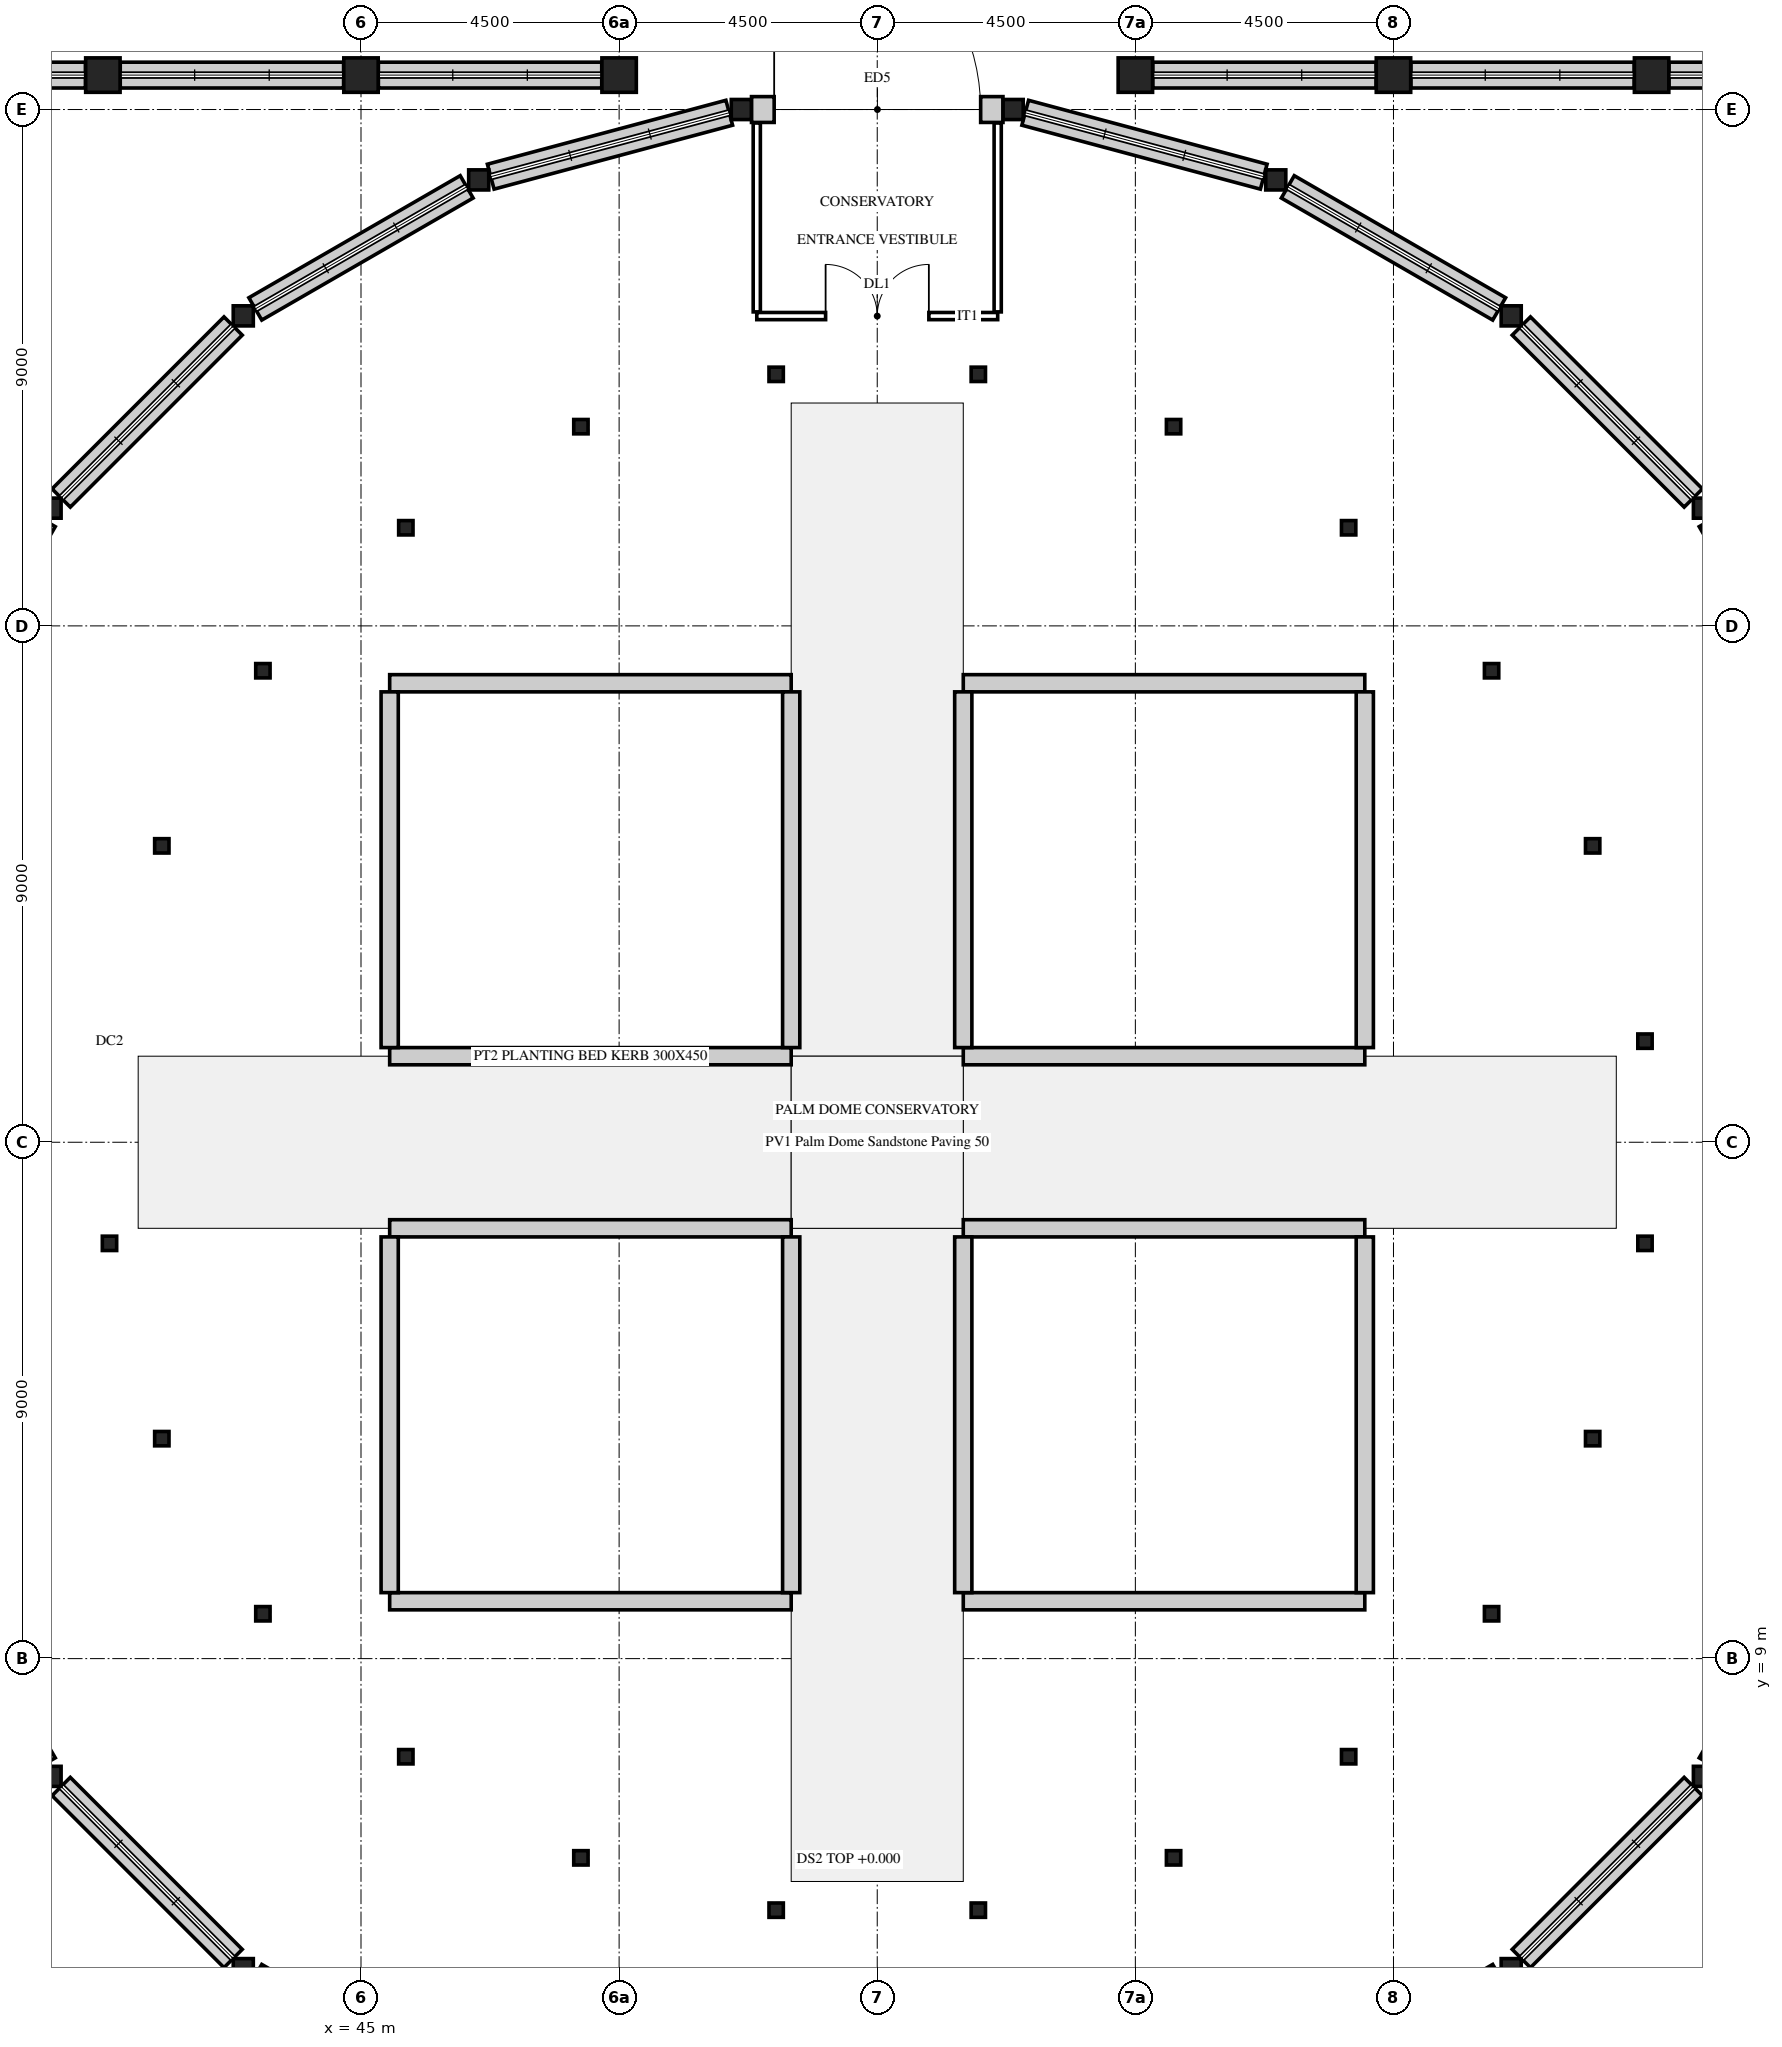
"""IFC4 building model, lengths in metres.
Left out: names, types, materials, properties, quantities, classifications, styles, units other than length and angle.
Written with IfcOpenShell. Run it as: python <this file> out.ifc"""

import sys

from ifc_helpers import new_model, si_unit, direction, frame, frame_2d, origin, origin_2d, place, context, subcontext, project, spatial, rectangle, hollow_rectangle, extrude, element, fill, save


model = new_model("IFC4")
c1 = context("Model", 3, precision=1e-05, world=origin(), true_north=direction((0.0, 1.0)))
c2 = subcontext(c1, "Body", "Model", "MODEL_VIEW")
j1 = project(units=[si_unit("LENGTHUNIT", "METRE"), si_unit("PLANEANGLEUNIT", "RADIAN")], contexts=[c1])
p1 = place(None, origin())
s1 = spatial("IfcSite", under=j1, at=p1, CompositionType="ELEMENT")
p2 = place(p1, origin())
s2 = spatial("IfcBuilding", under=s1, at=p2, CompositionType="ELEMENT")
p3 = place(p2, origin())
s3 = spatial("IfcBuildingStorey", under=s2, at=p3, CompositionType="ELEMENT", Elevation=0.0)
for number, where, z_axis, x_axis in (
    (1, (68.404, 29.052, 0.0), (0.0, 0.0, 1.0), (1.0, 0.0, 0.0)),
    (2, (65.052, 32.404, 0.0), (0.0, 0.0, 1.0), (1.0, 0.0, 0.0)),
    (3, (60.948, 34.773, 0.0), (0.0, 0.0, 1.0), (1.0, 0.0, 0.0)),
    (4, (56.37, 36.0, 0.0), (0.0, 0.0, 1.0), (1.0, 0.0, 0.0)),
    (5, (51.63, 36.0, 0.0), (0.0, 0.0, 1.0), (1.0, 0.0, 0.0)),
    (6, (47.052, 34.773, 0.0), (0.0, 0.0, 1.0), (1.0, 0.0, 0.0)),
    (7, (42.948, 32.404, 0.0), (0.0, 0.0, 1.0), (1.0, 0.0, 0.0)),
    (8, (39.596, 29.052, 0.0), (0.0, 0.0, 1.0), (1.0, 0.0, 0.0)),
    (9, (39.596, 6.948, 0.0), (0.0, 0.0, 1.0), (1.0, 0.0, 0.0)),
    (10, (42.948, 3.596, 0.0), (0.0, 0.0, 1.0), (1.0, 0.0, 0.0)),
    (11, (65.052, 3.596, 0.0), (0.0, 0.0, 1.0), (1.0, 0.0, 0.0)),
    (12, (68.404, 6.948, 0.0), (0.0, 0.0, 1.0), (1.0, 0.0, 0.0)),
):
    element("IfcColumn", number, at=place(p3, frame(where, z_axis=z_axis, x_axis=x_axis)), inside=s3, PredefinedType="COLUMN", context=c2, shape_type="SweptSolid", body=[
        extrude(hollow_rectangle(XDim=0.35, YDim=0.35, WallThickness=0.012, InnerFilletRadius=0.019, OuterFilletRadius=0.031, at=origin_2d()), origin(), (0.0, 0.0, 1.0), 6.0),
    ])
for number, where, z_axis, x_axis in (
    (13, (67.385, 19.762, 0.0), (0.0, 0.0, 1.0), (1.0, 0.0, 0.0)),
    (14, (66.472, 23.166, 0.0), (0.0, 0.0, 1.0), (1.0, 0.0, 0.0)),
    (15, (64.71, 26.218, 0.0), (0.0, 0.0, 1.0), (1.0, 0.0, 0.0)),
    (16, (62.218, 28.71, 0.0), (0.0, 0.0, 1.0), (1.0, 0.0, 0.0)),
    (17, (59.166, 30.472, 0.0), (0.0, 0.0, 1.0), (1.0, 0.0, 0.0)),
    (18, (55.762, 31.385, 0.0), (0.0, 0.0, 1.0), (1.0, 0.0, 0.0)),
    (19, (52.238, 31.385, 0.0), (0.0, 0.0, 1.0), (1.0, 0.0, 0.0)),
    (20, (48.834, 30.472, 0.0), (0.0, 0.0, 1.0), (1.0, 0.0, 0.0)),
    (21, (45.782, 28.71, 0.0), (0.0, 0.0, 1.0), (1.0, 0.0, 0.0)),
    (22, (43.29, 26.218, 0.0), (0.0, 0.0, 1.0), (1.0, 0.0, 0.0)),
    (23, (41.528, 23.166, 0.0), (0.0, 0.0, 1.0), (1.0, 0.0, 0.0)),
    (24, (40.615, 19.762, 0.0), (0.0, 0.0, 1.0), (1.0, 0.0, 0.0)),
    (25, (40.615, 16.238, 0.0), (0.0, 0.0, 1.0), (1.0, 0.0, 0.0)),
    (26, (41.528, 12.834, 0.0), (0.0, 0.0, 1.0), (1.0, 0.0, 0.0)),
    (27, (43.29, 9.782, 0.0), (0.0, 0.0, 1.0), (1.0, 0.0, 0.0)),
    (28, (45.782, 7.29, 0.0), (0.0, 0.0, 1.0), (1.0, 0.0, 0.0)),
    (29, (48.834, 5.528, 0.0), (0.0, 0.0, 1.0), (1.0, 0.0, 0.0)),
    (30, (52.238, 4.615, 0.0), (0.0, 0.0, 1.0), (1.0, 0.0, 0.0)),
    (31, (55.762, 4.615, 0.0), (0.0, 0.0, 1.0), (1.0, 0.0, 0.0)),
    (32, (59.166, 5.528, 0.0), (0.0, 0.0, 1.0), (1.0, 0.0, 0.0)),
    (33, (62.218, 7.29, 0.0), (0.0, 0.0, 1.0), (1.0, 0.0, 0.0)),
    (34, (64.71, 9.782, 0.0), (0.0, 0.0, 1.0), (1.0, 0.0, 0.0)),
    (35, (66.472, 12.834, 0.0), (0.0, 0.0, 1.0), (1.0, 0.0, 0.0)),
    (36, (67.385, 16.238, 0.0), (0.0, 0.0, 1.0), (1.0, 0.0, 0.0)),
):
    element("IfcColumn", number, at=place(p3, frame(where, z_axis=z_axis, x_axis=x_axis)), inside=s3, PredefinedType="COLUMN", context=c2, shape_type="SweptSolid", body=[
        extrude(hollow_rectangle(XDim=0.25, YDim=0.25, WallThickness=0.009, InnerFilletRadius=0.013, OuterFilletRadius=0.022, at=origin_2d()), origin(), (0.0, 0.0, 1.0), 5.493),
    ])
for number, where, z_axis, x_axis in (
    (37, (40.5, 36.6, -0.2), (0.0, 0.0, 1.0), (1.0, 0.0, 0.0)),
    (38, (45.0, 36.6, -0.2), (0.0, 0.0, 1.0), (1.0, 0.0, 0.0)),
    (39, (49.5, 36.6, -0.2), (0.0, 0.0, 1.0), (1.0, 0.0, 0.0)),
    (40, (58.5, 36.6, -0.2), (0.0, 0.0, 1.0), (1.0, 0.0, 0.0)),
    (41, (63.0, 36.6, -0.2), (0.0, 0.0, 1.0), (1.0, 0.0, 0.0)),
    (42, (67.5, 36.6, -0.2), (0.0, 0.0, 1.0), (1.0, 0.0, 0.0)),
):
    element("IfcColumn", number, at=place(p3, frame(where, z_axis=z_axis, x_axis=x_axis)), inside=s3, PredefinedType="COLUMN", context=c2, shape_type="SweptSolid", body=[
        extrude(rectangle(XDim=0.6, YDim=0.6, at=origin_2d()), origin(), (0.0, 0.0, 1.0), 5.702),
    ])
p4 = place(p3, frame((68.525, 28.842, 0.0), z_axis=(0.0, 0.0, 1.0), x_axis=(0.49998406464, -0.866034603873, 0.0)))
e43 = element("IfcWall", 43, at=p4, inside=s3, PredefinedType="STANDARD", context=c2, shape_type="SweptSolid", body=[
    extrude(rectangle(XDim=4.255, YDim=0.45, at=frame_2d((2.127, 0.0))), origin(), (0.0, 0.0, 1.0), 0.9),
])
p5 = place(p3, frame((65.229, 32.227, 0.0), z_axis=(0.0, 0.0, 1.0), x_axis=(0.707106781187, -0.707106781187, 0.0)))
e44 = element("IfcWall", 44, at=p5, inside=s3, PredefinedType="STANDARD", context=c2, shape_type="SweptSolid", body=[
    extrude(rectangle(XDim=4.24, YDim=0.45, at=frame_2d((2.12, 0.0))), origin(), (0.0, 0.0, 1.0), 0.9),
])
p6 = place(p3, frame((61.158, 34.652, 0.0), z_axis=(0.0, 0.0, 1.0), x_axis=(0.866034603873, -0.49998406464, 0.0)))
e45 = element("IfcWall", 45, at=p6, inside=s3, PredefinedType="STANDARD", context=c2, shape_type="SweptSolid", body=[
    extrude(rectangle(XDim=4.255, YDim=0.45, at=frame_2d((2.127, 0.0))), origin(), (0.0, 0.0, 1.0), 0.9),
])
p7 = place(p3, frame((56.58, 35.944, 0.0), z_axis=(0.0, 0.0, 1.0), x_axis=(0.965935901267, -0.258781441844, 0.0)))
e46 = element("IfcWall", 46, at=p7, inside=s3, PredefinedType="STANDARD", context=c2, shape_type="SweptSolid", body=[
    extrude(rectangle(XDim=4.305, YDim=0.45, at=frame_2d((2.152, 0.0))), origin(), (0.0, 0.0, 1.0), 0.9),
])
p8 = place(p3, frame((51.808, 36.0, 0.0), z_axis=(0.0, 0.0, 1.0), x_axis=(1.0, 0.0, 0.0)))
e47 = element("IfcWall", 47, at=p8, inside=s3, PredefinedType="STANDARD", context=c2, shape_type="SweptSolid", body=[
    extrude(rectangle(XDim=4.384, YDim=0.45, at=frame_2d((2.192, 0.0))), origin(), (0.0, 0.0, 1.0), 6.0),
])
p9 = place(p8, frame((0.395, 0.0, 0.012)))
e48 = element("IfcOpeningElement", 48, at=p9, cuts=e47, PredefinedType="OPENING", context=c2, shape_type="SweptSolid", body=[
    extrude(rectangle(XDim=3.6, YDim=2.7, at=frame_2d((1.8, 1.35))), frame((0.0, 0.235, 0.0), z_axis=(0.0, -1.0, 0.0), x_axis=(1.0, 0.0, 0.0)), (0.0, 0.0, 1.0), 0.47),
])
p10 = place(p3, frame((47.262, 34.83, 0.0), z_axis=(0.0, 0.0, 1.0), x_axis=(0.965935901267, 0.258781441844, 0.0)))
e49 = element("IfcWall", 49, at=p10, inside=s3, PredefinedType="STANDARD", context=c2, shape_type="SweptSolid", body=[
    extrude(rectangle(XDim=4.305, YDim=0.45, at=frame_2d((2.152, 0.0))), origin(), (0.0, 0.0, 1.0), 0.9),
])
p11 = place(p3, frame((43.158, 32.525, 0.0), z_axis=(0.0, 0.0, 1.0), x_axis=(0.866034603873, 0.49998406464, 0.0)))
e50 = element("IfcWall", 50, at=p11, inside=s3, PredefinedType="STANDARD", context=c2, shape_type="SweptSolid", body=[
    extrude(rectangle(XDim=4.255, YDim=0.45, at=frame_2d((2.127, 0.0))), origin(), (0.0, 0.0, 1.0), 0.9),
])
p12 = place(p3, frame((39.773, 29.229, 0.0), z_axis=(0.0, 0.0, 1.0), x_axis=(0.707106781187, 0.707106781187, 0.0)))
e51 = element("IfcWall", 51, at=p12, inside=s3, PredefinedType="STANDARD", context=c2, shape_type="SweptSolid", body=[
    extrude(rectangle(XDim=4.24, YDim=0.45, at=frame_2d((2.12, 0.0))), origin(), (0.0, 0.0, 1.0), 0.9),
])
for number, where, z_axis, x_axis in (
    (52, (37.348, 25.158, 0.0), (0.0, 0.0, 1.0), (0.5, 0.866, 0.0)),
    (53, (39.475, 7.158, 0.0), (0.0, 0.0, 1.0), (-0.5, 0.866, 0.0)),
):
    element("IfcWall", number, at=place(p3, frame(where, z_axis=z_axis, x_axis=x_axis)), inside=s3, PredefinedType="STANDARD", context=c2, shape_type="SweptSolid", body=[
        extrude(rectangle(XDim=4.255, YDim=0.45, at=frame_2d((2.127, 0.0))), origin(), (0.0, 0.0, 1.0), 0.9),
    ])
p13 = place(p3, frame((42.771, 3.773, 0.0), z_axis=(0.0, 0.0, 1.0), x_axis=(-0.707106781187, 0.707106781187, 0.0)))
e54 = element("IfcWall", 54, at=p13, inside=s3, PredefinedType="STANDARD", context=c2, shape_type="SweptSolid", body=[
    extrude(rectangle(XDim=4.24, YDim=0.45, at=frame_2d((2.12, 0.0))), origin(), (0.0, 0.0, 1.0), 0.9),
])
for number, where, z_axis, x_axis in (
    (55, (46.842, 1.348, 0.0), (0.0, 0.0, 1.0), (-0.866, 0.5, 0.0)),
    (56, (64.842, 3.475, 0.0), (0.0, 0.0, 1.0), (-0.866, -0.5, 0.0)),
):
    element("IfcWall", number, at=place(p3, frame(where, z_axis=z_axis, x_axis=x_axis)), inside=s3, PredefinedType="STANDARD", context=c2, shape_type="SweptSolid", body=[
        extrude(rectangle(XDim=4.255, YDim=0.45, at=frame_2d((2.127, 0.0))), origin(), (0.0, 0.0, 1.0), 0.9),
    ])
p14 = place(p3, frame((68.227, 6.771, 0.0), z_axis=(0.0, 0.0, 1.0), x_axis=(-0.707106781187, -0.707106781187, 0.0)))
e57 = element("IfcWall", 57, at=p14, inside=s3, PredefinedType="STANDARD", context=c2, shape_type="SweptSolid", body=[
    extrude(rectangle(XDim=4.24, YDim=0.45, at=frame_2d((2.12, 0.0))), origin(), (0.0, 0.0, 1.0), 0.9),
])
p15 = place(p3, frame((70.652, 10.842, 0.0), z_axis=(0.0, 0.0, 1.0), x_axis=(-0.49998406464, -0.866034603873, 0.0)))
e58 = element("IfcWall", 58, at=p15, inside=s3, PredefinedType="STANDARD", context=c2, shape_type="SweptSolid", body=[
    extrude(rectangle(XDim=4.255, YDim=0.45, at=frame_2d((2.127, 0.0))), origin(), (0.0, 0.0, 1.0), 0.9),
])
for number, where, z_axis, x_axis in (
    (59, (36.303, 36.6, 0.0), (0.0, 0.0, 1.0), (1.0, 0.0, 0.0)),
    (60, (40.803, 36.6, 0.0), (0.0, 0.0, 1.0), (1.0, 0.0, 0.0)),
    (61, (45.303, 36.6, 0.0), (0.0, 0.0, 1.0), (1.0, 0.0, 0.0)),
    (62, (58.803, 36.6, 0.0), (0.0, 0.0, 1.0), (1.0, 0.0, 0.0)),
    (63, (63.303, 36.6, 0.0), (0.0, 0.0, 1.0), (1.0, 0.0, 0.0)),
    (64, (67.803, 36.6, 0.0), (0.0, 0.0, 1.0), (1.0, 0.0, 0.0)),
):
    element("IfcWall", number, at=place(p3, frame(where, z_axis=z_axis, x_axis=x_axis)), inside=s3, PredefinedType="STANDARD", context=c2, shape_type="SweptSolid", body=[
        extrude(rectangle(XDim=3.894, YDim=0.45, at=frame_2d((1.947, 0.0))), origin(), (0.0, 0.0, 1.0), 0.9),
    ])
for number, where, z_axis, x_axis in (
    (65, (51.9, 32.472, 0.0), (0.0, 0.0, 1.0), (0.0, 1.0, 0.0)),
    (66, (56.1, 32.472, 0.0), (0.0, 0.0, 1.0), (0.0, 1.0, 0.0)),
):
    element("IfcWall", number, at=place(p3, frame(where, z_axis=z_axis, x_axis=x_axis)), inside=s3, PredefinedType="PARTITIONING", context=c2, shape_type="SweptSolid", body=[
        extrude(rectangle(XDim=3.292, YDim=0.125, at=frame_2d((1.646, 0.0))), origin(), (0.0, 0.0, 1.0), 5.218),
    ])
p16 = place(p3, frame((51.9, 32.4, 0.0), z_axis=(0.0, 0.0, 1.0), x_axis=(1.0, 0.0, 0.0)))
e67 = element("IfcWall", 67, at=p16, inside=s3, PredefinedType="PARTITIONING", context=c2, shape_type="SweptSolid", body=[
    extrude(rectangle(XDim=4.2, YDim=0.125, at=frame_2d((2.1, 0.0))), origin(), (0.0, 0.0, 1.0), 5.218),
])
p17 = place(p16, frame((1.2, 0.0, 0.0)))
e68 = element("IfcOpeningElement", 68, at=p17, cuts=e67, PredefinedType="OPENING", context=c2, shape_type="SweptSolid", body=[
    extrude(rectangle(XDim=1.8, YDim=2.1, at=frame_2d((0.9, 1.05))), frame((0.0, 0.073, 0.0), z_axis=(0.0, -1.0, 0.0), x_axis=(1.0, 0.0, 0.0)), (0.0, 0.0, 1.0), 0.145),
])
for number, where, z_axis, x_axis in (
    (69, (55.5, 19.5, 0.0), (0.0, 0.0, 1.0), (1.0, 0.0, 0.0)),
    (70, (55.5, 26.0, 0.0), (0.0, 0.0, 1.0), (1.0, 0.0, 0.0)),
):
    element("IfcWall", number, at=place(p3, frame(where, z_axis=z_axis, x_axis=x_axis)), inside=s3, PredefinedType="STANDARD", context=c2, shape_type="SweptSolid", body=[
        extrude(rectangle(XDim=7.0, YDim=0.3, at=frame_2d((3.5, 0.0))), origin(), (0.0, 0.0, 1.0), 0.45),
    ])
for number, where, z_axis, x_axis in (
    (71, (55.5, 19.65, 0.0), (0.0, 0.0, 1.0), (0.0, 1.0, 0.0)),
    (72, (62.5, 19.65, 0.0), (0.0, 0.0, 1.0), (0.0, 1.0, 0.0)),
):
    element("IfcWall", number, at=place(p3, frame(where, z_axis=z_axis, x_axis=x_axis)), inside=s3, PredefinedType="STANDARD", context=c2, shape_type="SweptSolid", body=[
        extrude(rectangle(XDim=6.2, YDim=0.3, at=frame_2d((3.1, 0.0))), origin(), (0.0, 0.0, 1.0), 0.45),
    ])
for number, where, z_axis, x_axis in (
    (73, (45.5, 19.5, 0.0), (0.0, 0.0, 1.0), (1.0, 0.0, 0.0)),
    (74, (45.5, 26.0, 0.0), (0.0, 0.0, 1.0), (1.0, 0.0, 0.0)),
):
    element("IfcWall", number, at=place(p3, frame(where, z_axis=z_axis, x_axis=x_axis)), inside=s3, PredefinedType="STANDARD", context=c2, shape_type="SweptSolid", body=[
        extrude(rectangle(XDim=7.0, YDim=0.3, at=frame_2d((3.5, 0.0))), origin(), (0.0, 0.0, 1.0), 0.45),
    ])
for number, where, z_axis, x_axis in (
    (75, (45.5, 19.65, 0.0), (0.0, 0.0, 1.0), (0.0, 1.0, 0.0)),
    (76, (52.5, 19.65, 0.0), (0.0, 0.0, 1.0), (0.0, 1.0, 0.0)),
):
    element("IfcWall", number, at=place(p3, frame(where, z_axis=z_axis, x_axis=x_axis)), inside=s3, PredefinedType="STANDARD", context=c2, shape_type="SweptSolid", body=[
        extrude(rectangle(XDim=6.2, YDim=0.3, at=frame_2d((3.1, 0.0))), origin(), (0.0, 0.0, 1.0), 0.45),
    ])
for number, where, z_axis, x_axis in (
    (77, (55.5, 10.0, 0.0), (0.0, 0.0, 1.0), (1.0, 0.0, 0.0)),
    (78, (55.5, 16.5, 0.0), (0.0, 0.0, 1.0), (1.0, 0.0, 0.0)),
):
    element("IfcWall", number, at=place(p3, frame(where, z_axis=z_axis, x_axis=x_axis)), inside=s3, PredefinedType="STANDARD", context=c2, shape_type="SweptSolid", body=[
        extrude(rectangle(XDim=7.0, YDim=0.3, at=frame_2d((3.5, 0.0))), origin(), (0.0, 0.0, 1.0), 0.45),
    ])
for number, where, z_axis, x_axis in (
    (79, (55.5, 10.15, 0.0), (0.0, 0.0, 1.0), (0.0, 1.0, 0.0)),
    (80, (62.5, 10.15, 0.0), (0.0, 0.0, 1.0), (0.0, 1.0, 0.0)),
):
    element("IfcWall", number, at=place(p3, frame(where, z_axis=z_axis, x_axis=x_axis)), inside=s3, PredefinedType="STANDARD", context=c2, shape_type="SweptSolid", body=[
        extrude(rectangle(XDim=6.2, YDim=0.3, at=frame_2d((3.1, 0.0))), origin(), (0.0, 0.0, 1.0), 0.45),
    ])
for number, where, z_axis, x_axis in (
    (81, (45.5, 10.0, 0.0), (0.0, 0.0, 1.0), (1.0, 0.0, 0.0)),
    (82, (45.5, 16.5, 0.0), (0.0, 0.0, 1.0), (1.0, 0.0, 0.0)),
):
    element("IfcWall", number, at=place(p3, frame(where, z_axis=z_axis, x_axis=x_axis)), inside=s3, PredefinedType="STANDARD", context=c2, shape_type="SweptSolid", body=[
        extrude(rectangle(XDim=7.0, YDim=0.3, at=frame_2d((3.5, 0.0))), origin(), (0.0, 0.0, 1.0), 0.45),
    ])
for number, where, z_axis, x_axis in (
    (83, (45.5, 10.15, 0.0), (0.0, 0.0, 1.0), (0.0, 1.0, 0.0)),
    (84, (52.5, 10.15, 0.0), (0.0, 0.0, 1.0), (0.0, 1.0, 0.0)),
):
    element("IfcWall", number, at=place(p3, frame(where, z_axis=z_axis, x_axis=x_axis)), inside=s3, PredefinedType="STANDARD", context=c2, shape_type="SweptSolid", body=[
        extrude(rectangle(XDim=6.2, YDim=0.3, at=frame_2d((3.1, 0.0))), origin(), (0.0, 0.0, 1.0), 0.45),
    ])
p18 = place(p9, origin())
e85 = element("IfcDoor", 85, at=p18, inside=s3, OperationType="DOUBLE_DOOR_DOUBLE_SWING", PredefinedType="DOOR", context=c2, shape_type="SweptSolid", body=[
    extrude(rectangle(XDim=3.6, YDim=2.7, at=frame_2d((1.8, 1.35))), frame((0.0, 0.025, 0.0), z_axis=(0.0, -1.0, 0.0), x_axis=(1.0, 0.0, 0.0)), (0.0, 0.0, 1.0), 0.05),
])
fill(e48, e85)
p19 = place(p17, frame((1.8, 0.0, 0.0), z_axis=(0.0, 0.0, 1.0), x_axis=(-1.0, 0.0, 0.0)))
e86 = element("IfcDoor", 86, at=p19, inside=s3, OperationType="DOUBLE_DOOR_SINGLE_SWING", PredefinedType="DOOR", context=c2, shape_type="SweptSolid", body=[
    extrude(rectangle(XDim=1.8, YDim=2.1, at=frame_2d((0.9, 1.05))), frame((0.0, 0.025, 0.0), z_axis=(0.0, -1.0, 0.0), x_axis=(1.0, 0.0, 0.0)), (0.0, 0.0, 1.0), 0.05),
])
fill(e68, e86)
save(model, sys.argv[1])
